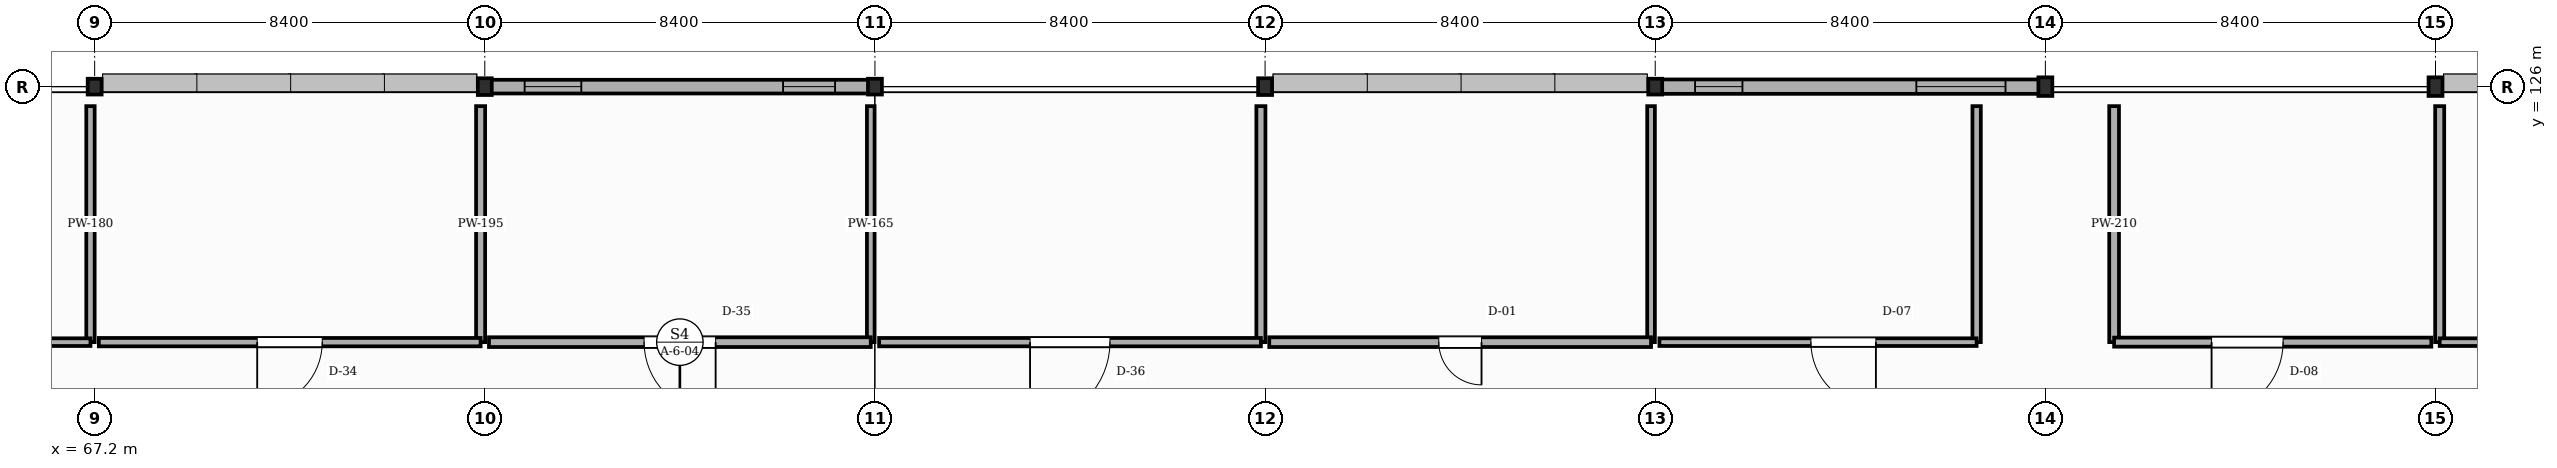
"""IFC4 building model, lengths in metres.
Left out: names, types, materials, properties, quantities, classifications, styles, units other than length and angle.
Written with IfcOpenShell. Run it as: python <this file> out.ifc"""

import sys

from ifc_helpers import new_model, si_unit, direction, frame, frame_2d, origin, origin_2d, place, context, subcontext, project, spatial, rectangle, i_section, extrude, element, fill, save


model = new_model("IFC4")
c1 = context("Model", 3, precision=1e-05, world=origin(), true_north=direction((0.0, 1.0)))
c2 = subcontext(c1, "Body", "Model", "MODEL_VIEW")
j1 = project(units=[si_unit("LENGTHUNIT", "METRE"), si_unit("PLANEANGLEUNIT", "RADIAN")], contexts=[c1])
p1 = place(None, origin())
s1 = spatial("IfcSite", under=j1, at=p1, CompositionType="ELEMENT")
p2 = place(p1, origin())
s2 = spatial("IfcBuilding", under=s1, at=p2, CompositionType="ELEMENT")
p3 = place(p2, frame((0.0, 0.0, 22.05)))
s3 = spatial("IfcBuildingStorey", under=s2, at=p3, CompositionType="ELEMENT", Elevation=22.05)
p4 = place(p3, frame((67.2, 126.0, 0.0), z_axis=(0.0, 0.0, 1.0), x_axis=(1.0, 0.0, 0.0)))
e1 = element("IfcColumn", 1, at=p4, inside=s3, PredefinedType="COLUMN", context=c2, shape_type="SweptSolid", body=[
    extrude(i_section(OverallWidth=0.3, OverallDepth=0.34, WebThickness=0.012, FlangeThickness=0.021, FilletRadius=0.027, at=origin_2d()), origin(), (0.0, 0.0, 1.0), 4.05),
])
p5 = place(p3, frame((75.6, 126.0, 0.0), z_axis=(0.0, 0.0, 1.0), x_axis=(1.0, 0.0, 0.0)))
e2 = element("IfcColumn", 2, at=p5, inside=s3, PredefinedType="COLUMN", context=c2, shape_type="SweptSolid", body=[
    extrude(i_section(OverallWidth=0.3, OverallDepth=0.36, WebThickness=0.012, FlangeThickness=0.022, FilletRadius=0.027, at=origin_2d()), origin(), (0.0, 0.0, 1.0), 4.05),
])
p6 = place(p3, frame((84.0, 126.0, 0.0), z_axis=(0.0, 0.0, 1.0), x_axis=(1.0, 0.0, 0.0)))
e3 = element("IfcColumn", 3, at=p6, inside=s3, PredefinedType="COLUMN", context=c2, shape_type="SweptSolid", body=[
    extrude(i_section(OverallWidth=0.3, OverallDepth=0.34, WebThickness=0.012, FlangeThickness=0.021, FilletRadius=0.027, at=origin_2d()), origin(), (0.0, 0.0, 1.0), 4.05),
])
p7 = place(p3, frame((92.4, 126.0, 0.0), z_axis=(0.0, 0.0, 1.0), x_axis=(1.0, 0.0, 0.0)))
e4 = element("IfcColumn", 4, at=p7, inside=s3, PredefinedType="COLUMN", context=c2, shape_type="SweptSolid", body=[
    extrude(i_section(OverallWidth=0.3, OverallDepth=0.36, WebThickness=0.012, FlangeThickness=0.022, FilletRadius=0.027, at=origin_2d()), origin(), (0.0, 0.0, 1.0), 4.05),
])
p8 = place(p3, frame((100.8, 126.0, 0.0), z_axis=(0.0, 0.0, 1.0), x_axis=(1.0, 0.0, 0.0)))
e5 = element("IfcColumn", 5, at=p8, inside=s3, PredefinedType="COLUMN", context=c2, shape_type="SweptSolid", body=[
    extrude(i_section(OverallWidth=0.3, OverallDepth=0.34, WebThickness=0.012, FlangeThickness=0.021, FilletRadius=0.027, at=origin_2d()), origin(), (0.0, 0.0, 1.0), 4.05),
])
for number, where, z_axis, x_axis in (
    (6, (109.2, 126.0, 0.0), (0.0, 0.0, 1.0), (1.0, 0.0, 0.0)),
    (7, (117.6, 126.0, 0.0), (0.0, 0.0, 1.0), (1.0, 0.0, 0.0)),
):
    element("IfcColumn", number, at=place(p3, frame(where, z_axis=z_axis, x_axis=x_axis)), inside=s3, PredefinedType="COLUMN", context=c2, shape_type="SweptSolid", body=[
        extrude(i_section(OverallWidth=0.3, OverallDepth=0.4, WebThickness=0.013, FlangeThickness=0.024, FilletRadius=0.027, at=origin_2d()), origin(), (0.0, 0.0, 1.0), 4.05),
    ])
p9 = place(p3, frame((109.192, 126.0, 0.0), z_axis=(0.0, 0.0, 1.0), x_axis=(-1.0, 0.0, 0.0)))
e8 = element("IfcWall", 8, at=p9, inside=s3, PredefinedType="STANDARD", context=c2, shape_type="SweptSolid", body=[
    extrude(rectangle(XDim=8.384, YDim=0.31, at=frame_2d((4.192, 0.0))), origin(), (0.0, 0.0, 1.0), 3.527),
])
p10 = place(p9, frame((0.85, 0.0, 0.9)))
e9 = element("IfcOpeningElement", 9, at=p10, cuts=e8, PredefinedType="OPENING", context=c2, shape_type="SweptSolid", body=[
    extrude(rectangle(XDim=1.92, YDim=1.05, at=frame_2d((0.96, 0.525))), frame((0.0, 0.165, 0.0), z_axis=(0.0, -1.0, 0.0), x_axis=(1.0, 0.0, 0.0)), (0.0, 0.0, 1.0), 0.33),
])
p11 = place(p9, frame((6.514, 0.0, 0.9)))
e10 = element("IfcOpeningElement", 10, at=p11, cuts=e8, PredefinedType="OPENING", context=c2, shape_type="SweptSolid", body=[
    extrude(rectangle(XDim=1.02, YDim=1.25, at=frame_2d((0.51, 0.625))), frame((0.0, 0.165, 0.0), z_axis=(0.0, -1.0, 0.0), x_axis=(1.0, 0.0, 0.0)), (0.0, 0.0, 1.0), 0.33),
])
p12 = place(p3, frame((83.992, 126.0, 0.0), z_axis=(0.0, 0.0, 1.0), x_axis=(-1.0, 0.0, 0.0)))
e11 = element("IfcWall", 11, at=p12, inside=s3, PredefinedType="STANDARD", context=c2, shape_type="SweptSolid", body=[
    extrude(rectangle(XDim=8.384, YDim=0.295, at=frame_2d((4.192, 0.0))), origin(), (0.0, 0.0, 1.0), 3.497),
])
p13 = place(p12, frame((0.85, 0.0, 0.9)))
e12 = element("IfcOpeningElement", 12, at=p13, cuts=e11, PredefinedType="OPENING", context=c2, shape_type="SweptSolid", body=[
    extrude(rectangle(XDim=1.12, YDim=1.25, at=frame_2d((0.56, 0.625))), frame((0.0, 0.157, 0.0), z_axis=(0.0, -1.0, 0.0), x_axis=(1.0, 0.0, 0.0)), (0.0, 0.0, 1.0), 0.315),
])
p14 = place(p12, frame((6.314, 0.0, 0.9)))
e13 = element("IfcOpeningElement", 13, at=p14, cuts=e11, PredefinedType="OPENING", context=c2, shape_type="SweptSolid", body=[
    extrude(rectangle(XDim=1.22, YDim=1.25, at=frame_2d((0.61, 0.625))), frame((0.0, 0.157, 0.0), z_axis=(0.0, -1.0, 0.0), x_axis=(1.0, 0.0, 0.0)), (0.0, 0.0, 1.0), 0.315),
])
p15 = place(p3, frame((67.11, 125.58, -0.004), z_axis=(0.0, 0.0, 1.0), x_axis=(0.0, -1.0, 0.0)))
e14 = element("IfcWall", 14, at=p15, inside=s3, PredefinedType="STANDARD", context=c2, shape_type="SweptSolid", body=[
    extrude(rectangle(XDim=5.08, YDim=0.18, at=frame_2d((2.54, 0.0))), origin(), (0.0, 0.0, 1.0), 3.551),
])
p16 = place(p3, frame((67.11, 120.5, -0.004), z_axis=(0.0, 0.0, 1.0), x_axis=(-1.0, 0.0, 0.0)))
e15 = element("IfcWall", 15, at=p16, inside=s3, PredefinedType="STANDARD", context=c2, shape_type="SweptSolid", body=[
    extrude(rectangle(XDim=8.22, YDim=0.165, at=frame_2d((4.11, 0.0))), origin(), (0.0, 0.0, 1.0), 3.854),
])
p17 = place(p16, frame((3.47, 0.0, 0.0)))
e16 = element("IfcOpeningElement", 16, at=p17, cuts=e15, PredefinedType="OPENING", context=c2, shape_type="SweptSolid", body=[
    extrude(rectangle(XDim=1.28, YDim=2.3, at=frame_2d((0.64, 1.15))), frame((0.0, 0.093, 0.0), z_axis=(0.0, -1.0, 0.0), x_axis=(1.0, 0.0, 0.0)), (0.0, 0.0, 1.0), 0.185),
])
p18 = place(p3, frame((75.51, 125.58, -0.004), z_axis=(0.0, 0.0, 1.0), x_axis=(0.0, -1.0, 0.0)))
e17 = element("IfcWall", 17, at=p18, inside=s3, PredefinedType="STANDARD", context=c2, shape_type="SweptSolid", body=[
    extrude(rectangle(XDim=5.08, YDim=0.195, at=frame_2d((2.54, 0.0))), origin(), (0.0, 0.0, 1.0), 3.261),
])
p19 = place(p3, frame((75.51, 120.5, -0.004), z_axis=(0.0, 0.0, 1.0), x_axis=(-1.0, 0.0, 0.0)))
e18 = element("IfcWall", 18, at=p19, inside=s3, PredefinedType="STANDARD", context=c2, shape_type="SweptSolid", body=[
    extrude(rectangle(XDim=8.22, YDim=0.18, at=frame_2d((4.11, 0.0))), origin(), (0.0, 0.0, 1.0), 3.854),
])
p20 = place(p19, frame((3.41, 0.0, 0.0)))
e19 = element("IfcOpeningElement", 19, at=p20, cuts=e18, PredefinedType="OPENING", context=c2, shape_type="SweptSolid", body=[
    extrude(rectangle(XDim=1.4, YDim=2.3, at=frame_2d((0.7, 1.15))), frame((0.0, 0.1, 0.0), z_axis=(0.0, -1.0, 0.0), x_axis=(1.0, 0.0, 0.0)), (0.0, 0.0, 1.0), 0.2),
])
p21 = place(p3, frame((83.91, 125.58, -0.004), z_axis=(0.0, 0.0, 1.0), x_axis=(0.0, -1.0, 0.0)))
e20 = element("IfcWall", 20, at=p21, inside=s3, PredefinedType="STANDARD", context=c2, shape_type="SweptSolid", body=[
    extrude(rectangle(XDim=5.08, YDim=0.165, at=frame_2d((2.54, 0.0))), origin(), (0.0, 0.0, 1.0), 3.371),
])
p22 = place(p3, frame((83.91, 120.5, -0.004), z_axis=(0.0, 0.0, 1.0), x_axis=(-1.0, 0.0, 0.0)))
e21 = element("IfcWall", 21, at=p22, inside=s3, PredefinedType="STANDARD", context=c2, shape_type="SweptSolid", body=[
    extrude(rectangle(XDim=8.22, YDim=0.21, at=frame_2d((4.11, 0.0))), origin(), (0.0, 0.0, 1.0), 3.854),
])
p23 = place(p22, frame((3.34, 0.0, 0.0)))
e22 = element("IfcOpeningElement", 22, at=p23, cuts=e21, PredefinedType="OPENING", context=c2, shape_type="SweptSolid", body=[
    extrude(rectangle(XDim=1.54, YDim=2.3, at=frame_2d((0.77, 1.15))), frame((0.0, 0.115, 0.0), z_axis=(0.0, -1.0, 0.0), x_axis=(1.0, 0.0, 0.0)), (0.0, 0.0, 1.0), 0.23),
])
p24 = place(p3, frame((92.31, 125.58, -0.004), z_axis=(0.0, 0.0, 1.0), x_axis=(0.0, -1.0, 0.0)))
e23 = element("IfcWall", 23, at=p24, inside=s3, PredefinedType="STANDARD", context=c2, shape_type="SweptSolid", body=[
    extrude(rectangle(XDim=5.08, YDim=0.195, at=frame_2d((2.54, 0.0))), origin(), (0.0, 0.0, 1.0), 3.461),
])
p25 = place(p3, frame((92.31, 120.5, -0.004), z_axis=(0.0, 0.0, 1.0), x_axis=(-1.0, 0.0, 0.0)))
e24 = element("IfcWall", 24, at=p25, inside=s3, PredefinedType="STANDARD", context=c2, shape_type="SweptSolid", body=[
    extrude(rectangle(XDim=8.22, YDim=0.18, at=frame_2d((4.11, 0.0))), origin(), (0.0, 0.0, 1.0), 3.854),
])
p26 = place(p25, frame((3.25, 0.0, 0.0)))
e25 = element("IfcOpeningElement", 25, at=p26, cuts=e24, PredefinedType="OPENING", context=c2, shape_type="SweptSolid", body=[
    extrude(rectangle(XDim=1.72, YDim=2.3, at=frame_2d((0.86, 1.15))), frame((0.0, 0.1, 0.0), z_axis=(0.0, -1.0, 0.0), x_axis=(1.0, 0.0, 0.0)), (0.0, 0.0, 1.0), 0.2),
])
p27 = place(p3, frame((100.71, 125.58, -0.004), z_axis=(0.0, 0.0, 1.0), x_axis=(0.0, -1.0, 0.0)))
e26 = element("IfcWall", 26, at=p27, inside=s3, PredefinedType="STANDARD", context=c2, shape_type="SweptSolid", body=[
    extrude(rectangle(XDim=5.08, YDim=0.165, at=frame_2d((2.54, 0.0))), origin(), (0.0, 0.0, 1.0), 3.511),
])
p28 = place(p3, frame((100.71, 120.5, -0.004), z_axis=(0.0, 0.0, 1.0), x_axis=(-1.0, 0.0, 0.0)))
e27 = element("IfcWall", 27, at=p28, inside=s3, PredefinedType="STANDARD", context=c2, shape_type="SweptSolid", body=[
    extrude(rectangle(XDim=8.22, YDim=0.21, at=frame_2d((4.11, 0.0))), origin(), (0.0, 0.0, 1.0), 3.854),
])
p29 = place(p28, frame((3.65, 0.0, 0.0)))
e28 = element("IfcOpeningElement", 28, at=p29, cuts=e27, PredefinedType="OPENING", context=c2, shape_type="SweptSolid", body=[
    extrude(rectangle(XDim=0.92, YDim=2.06, at=frame_2d((0.46, 1.03))), frame((0.0, 0.115, 0.0), z_axis=(0.0, -1.0, 0.0), x_axis=(1.0, 0.0, 0.0)), (0.0, 0.0, 1.0), 0.23),
])
p30 = place(p3, frame((117.69, 120.5, -0.004), z_axis=(0.0, 0.0, 1.0), x_axis=(0.0, 1.0, 0.0)))
e29 = element("IfcWall", 29, at=p30, inside=s3, PredefinedType="STANDARD", context=c2, shape_type="SweptSolid", body=[
    extrude(rectangle(XDim=5.08, YDim=0.195, at=frame_2d((2.54, 0.0))), origin(), (0.0, 0.0, 1.0), 3.261),
])
p31 = place(p3, frame((125.91, 120.5, -0.004), z_axis=(0.0, 0.0, 1.0), x_axis=(-1.0, 0.0, 0.0)))
e30 = element("IfcWall", 30, at=p31, inside=s3, PredefinedType="STANDARD", context=c2, shape_type="SweptSolid", body=[
    extrude(rectangle(XDim=8.22, YDim=0.165, at=frame_2d((4.11, 0.0))), origin(), (0.0, 0.0, 1.0), 3.854),
])
p32 = place(p31, frame((3.62, 0.0, 0.0)))
e31 = element("IfcOpeningElement", 31, at=p32, cuts=e30, PredefinedType="OPENING", context=c2, shape_type="SweptSolid", body=[
    extrude(rectangle(XDim=0.98, YDim=2.06, at=frame_2d((0.49, 1.03))), frame((0.0, 0.093, 0.0), z_axis=(0.0, -1.0, 0.0), x_axis=(1.0, 0.0, 0.0)), (0.0, 0.0, 1.0), 0.185),
])
p33 = place(p3, frame((107.72, 125.58, -0.004), z_axis=(0.0, 0.0, 1.0), x_axis=(0.0, -1.0, 0.0)))
e32 = element("IfcWall", 32, at=p33, inside=s3, PredefinedType="STANDARD", context=c2, shape_type="SweptSolid", body=[
    extrude(rectangle(XDim=5.08, YDim=0.18, at=frame_2d((2.54, 0.0))), origin(), (0.0, 0.0, 1.0), 3.854),
])
p34 = place(p3, frame((107.72, 120.5, -0.004), z_axis=(0.0, 0.0, 1.0), x_axis=(-1.0, 0.0, 0.0)))
e33 = element("IfcWall", 33, at=p34, inside=s3, PredefinedType="STANDARD", context=c2, shape_type="SweptSolid", body=[
    extrude(rectangle(XDim=6.83, YDim=0.165, at=frame_2d((3.415, 0.0))), origin(), (0.0, 0.0, 1.0), 3.854),
])
p35 = place(p34, frame((2.169, 0.0, 0.0)))
e34 = element("IfcOpeningElement", 34, at=p35, cuts=e33, PredefinedType="OPENING", context=c2, shape_type="SweptSolid", body=[
    extrude(rectangle(XDim=1.4, YDim=2.06, at=frame_2d((0.7, 1.03))), frame((0.0, 0.093, 0.0), z_axis=(0.0, -1.0, 0.0), x_axis=(1.0, 0.0, 0.0)), (0.0, 0.0, 1.0), 0.185),
])
p36 = place(p3, frame((110.68, 120.5, -0.004), z_axis=(0.0, 0.0, 1.0), x_axis=(0.0, 1.0, 0.0)))
e35 = element("IfcWall", 35, at=p36, inside=s3, PredefinedType="STANDARD", context=c2, shape_type="SweptSolid", body=[
    extrude(rectangle(XDim=5.08, YDim=0.21, at=frame_2d((2.54, 0.0))), origin(), (0.0, 0.0, 1.0), 3.854),
])
p37 = place(p3, frame((117.51, 120.5, -0.004), z_axis=(0.0, 0.0, 1.0), x_axis=(-1.0, 0.0, 0.0)))
e36 = element("IfcWall", 36, at=p37, inside=s3, PredefinedType="STANDARD", context=c2, shape_type="SweptSolid", body=[
    extrude(rectangle(XDim=6.83, YDim=0.195, at=frame_2d((3.415, 0.0))), origin(), (0.0, 0.0, 1.0), 3.854),
])
p38 = place(p37, frame((3.191, 0.0, 0.0)))
e37 = element("IfcOpeningElement", 37, at=p38, cuts=e36, PredefinedType="OPENING", context=c2, shape_type="SweptSolid", body=[
    extrude(rectangle(XDim=1.54, YDim=2.06, at=frame_2d((0.77, 1.03))), frame((0.0, 0.107, 0.0), z_axis=(0.0, -1.0, 0.0), x_axis=(1.0, 0.0, 0.0)), (0.0, 0.0, 1.0), 0.215),
])
p39 = place(p10, origin())
e38 = element("IfcWindow", 38, at=p39, inside=s3, PartitioningType="SINGLE_PANEL", PredefinedType="WINDOW", context=c2, shape_type="SweptSolid", body=[
    extrude(rectangle(XDim=1.92, YDim=1.05, at=frame_2d((0.96, 0.525))), frame((0.0, 0.03, 0.0), z_axis=(0.0, -1.0, 0.0), x_axis=(1.0, 0.0, 0.0)), (0.0, 0.0, 1.0), 0.06),
])
fill(e9, e38)
p40 = place(p11, origin())
e39 = element("IfcWindow", 39, at=p40, inside=s3, PartitioningType="SINGLE_PANEL", PredefinedType="WINDOW", context=c2, shape_type="SweptSolid", body=[
    extrude(rectangle(XDim=1.02, YDim=1.25, at=frame_2d((0.51, 0.625))), frame((0.0, 0.03, 0.0), z_axis=(0.0, -1.0, 0.0), x_axis=(1.0, 0.0, 0.0)), (0.0, 0.0, 1.0), 0.06),
])
fill(e10, e39)
p41 = place(p13, origin())
e40 = element("IfcWindow", 40, at=p41, inside=s3, PartitioningType="SINGLE_PANEL", PredefinedType="WINDOW", context=c2, shape_type="SweptSolid", body=[
    extrude(rectangle(XDim=1.12, YDim=1.25, at=frame_2d((0.56, 0.625))), frame((0.0, 0.03, 0.0), z_axis=(0.0, -1.0, 0.0), x_axis=(1.0, 0.0, 0.0)), (0.0, 0.0, 1.0), 0.06),
])
fill(e12, e40)
p42 = place(p14, origin())
e41 = element("IfcWindow", 41, at=p42, inside=s3, PartitioningType="SINGLE_PANEL", PredefinedType="WINDOW", context=c2, shape_type="SweptSolid", body=[
    extrude(rectangle(XDim=1.22, YDim=1.25, at=frame_2d((0.61, 0.625))), frame((0.0, 0.03, 0.0), z_axis=(0.0, -1.0, 0.0), x_axis=(1.0, 0.0, 0.0)), (0.0, 0.0, 1.0), 0.06),
])
fill(e13, e41)
p43 = place(p20, origin())
e42 = element("IfcDoor", 42, at=p43, inside=s3, OperationType="SINGLE_SWING_RIGHT", PredefinedType="DOOR", context=c2, shape_type="SweptSolid", body=[
    extrude(rectangle(XDim=1.4, YDim=2.3, at=frame_2d((0.7, 1.15))), frame((0.0, 0.025, 0.0), z_axis=(0.0, -1.0, 0.0), x_axis=(1.0, 0.0, 0.0)), (0.0, 0.0, 1.0), 0.05),
])
fill(e19, e42)
p44 = place(p23, origin())
e43 = element("IfcDoor", 43, at=p44, inside=s3, OperationType="SINGLE_SWING_LEFT", PredefinedType="DOOR", context=c2, shape_type="SweptSolid", body=[
    extrude(rectangle(XDim=1.54, YDim=2.3, at=frame_2d((0.77, 1.15))), frame((0.0, 0.025, 0.0), z_axis=(0.0, -1.0, 0.0), x_axis=(1.0, 0.0, 0.0)), (0.0, 0.0, 1.0), 0.05),
])
fill(e22, e43)
p45 = place(p26, origin())
e44 = element("IfcDoor", 44, at=p45, inside=s3, OperationType="SINGLE_SWING_RIGHT", PredefinedType="DOOR", context=c2, shape_type="SweptSolid", body=[
    extrude(rectangle(XDim=1.72, YDim=2.3, at=frame_2d((0.86, 1.15))), frame((0.0, 0.025, 0.0), z_axis=(0.0, -1.0, 0.0), x_axis=(1.0, 0.0, 0.0)), (0.0, 0.0, 1.0), 0.05),
])
fill(e25, e44)
p46 = place(p29, origin())
e45 = element("IfcDoor", 45, at=p46, inside=s3, OperationType="SINGLE_SWING_LEFT", PredefinedType="DOOR", context=c2, shape_type="SweptSolid", body=[
    extrude(rectangle(XDim=0.92, YDim=2.06, at=frame_2d((0.46, 1.03))), frame((0.0, 0.025, 0.0), z_axis=(0.0, -1.0, 0.0), x_axis=(1.0, 0.0, 0.0)), (0.0, 0.0, 1.0), 0.05),
])
fill(e28, e45)
p47 = place(p35, origin())
e46 = element("IfcDoor", 46, at=p47, inside=s3, OperationType="SINGLE_SWING_LEFT", PredefinedType="DOOR", context=c2, shape_type="SweptSolid", body=[
    extrude(rectangle(XDim=1.4, YDim=2.06, at=frame_2d((0.7, 1.03))), frame((0.0, 0.025, 0.0), z_axis=(0.0, -1.0, 0.0), x_axis=(1.0, 0.0, 0.0)), (0.0, 0.0, 1.0), 0.05),
])
fill(e34, e46)
p48 = place(p38, origin())
e47 = element("IfcDoor", 47, at=p48, inside=s3, OperationType="SINGLE_SWING_RIGHT", PredefinedType="DOOR", context=c2, shape_type="SweptSolid", body=[
    extrude(rectangle(XDim=1.54, YDim=2.06, at=frame_2d((0.77, 1.03))), frame((0.0, 0.025, 0.0), z_axis=(0.0, -1.0, 0.0), x_axis=(1.0, 0.0, 0.0)), (0.0, 0.0, 1.0), 0.05),
])
fill(e37, e47)
save(model, sys.argv[1])
